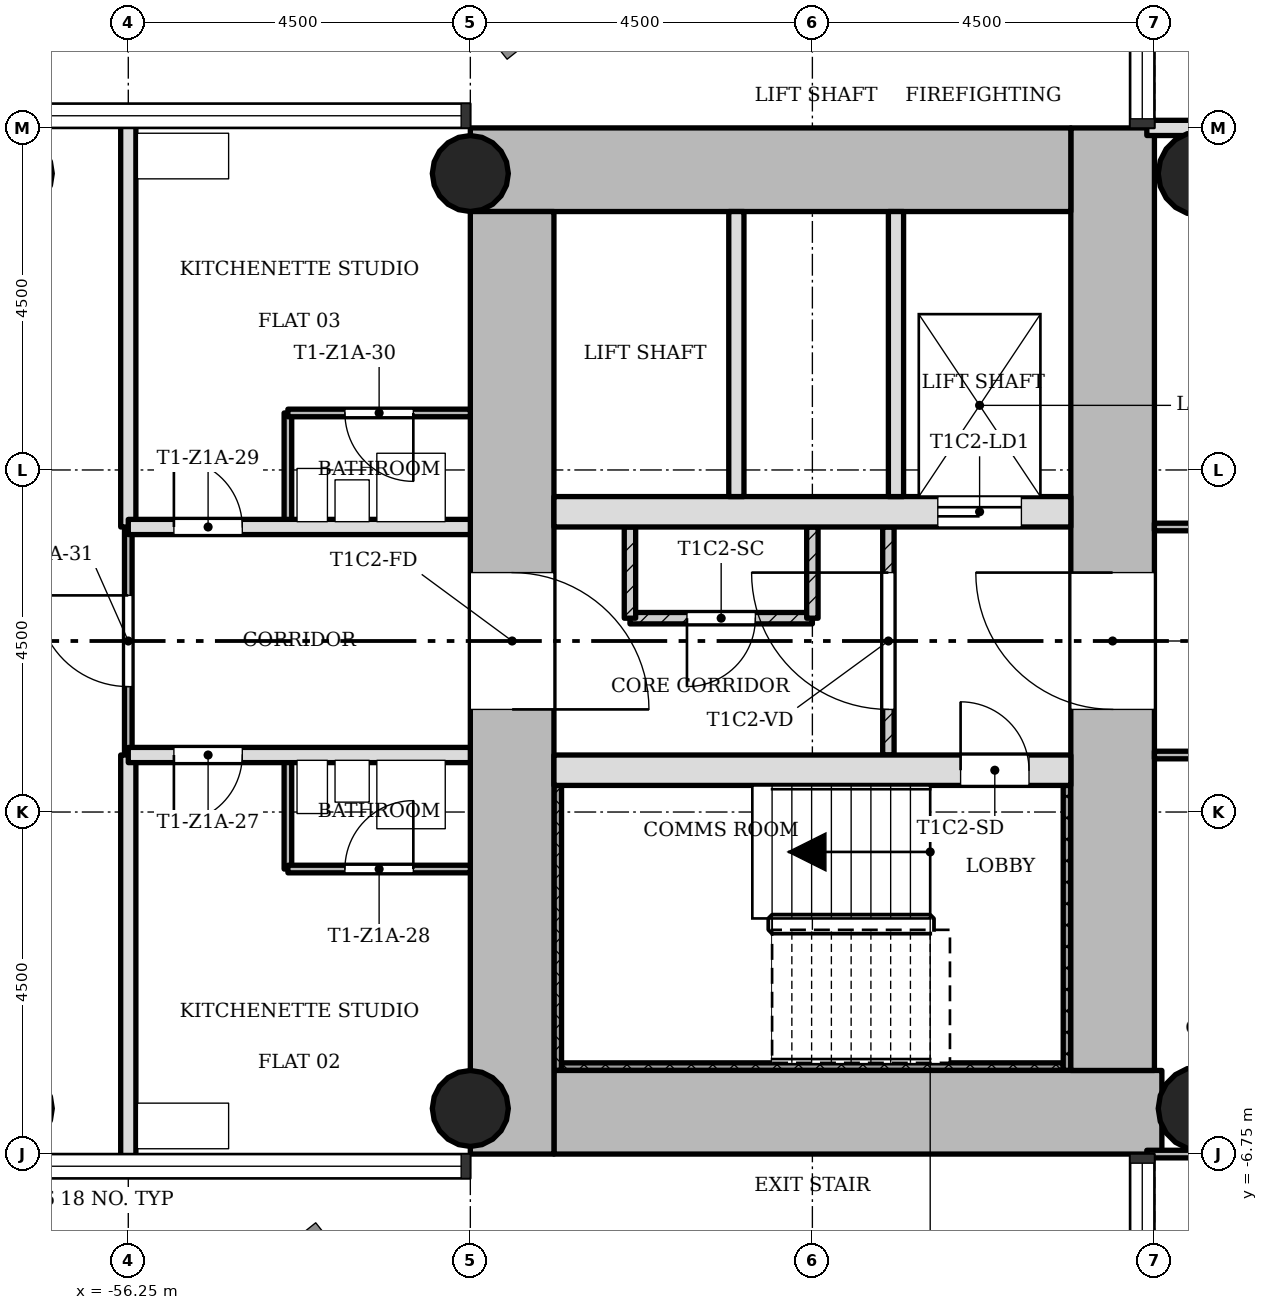
"""IFC4 building model, lengths in metres.
Left out: names, types, materials, properties, quantities, classifications, styles, units other than length and angle.
Written with IfcOpenShell. Run it as: python <this file> out.ifc"""

import sys

from ifc_helpers import new_model, si_unit, direction, frame, frame_2d, origin, origin_2d, place, context, subcontext, project, spatial, rectangle, hollow_circle, extrude, element, fill, save


model = new_model("IFC4")
c1 = context("Model", 3, precision=1e-05, world=origin(), true_north=direction((0.0, 1.0)))
c2 = subcontext(c1, "Body", "Model", "MODEL_VIEW")
j1 = project(units=[si_unit("LENGTHUNIT", "METRE"), si_unit("PLANEANGLEUNIT", "RADIAN")], contexts=[c1])
p1 = place(None, origin())
s1 = spatial("IfcSite", under=j1, at=p1, CompositionType="ELEMENT")
p2 = place(p1, origin())
s2 = spatial("IfcBuilding", under=s1, at=p2, CompositionType="ELEMENT")
p3 = place(p2, frame((0.0, 0.0, 24.5)))
s3 = spatial("IfcBuildingStorey", under=s2, at=p3, CompositionType="ELEMENT", Elevation=24.5)
p4 = place(p3, frame((-50.65, -6.2, 0.0), z_axis=(0.0, 0.0, 1.0), x_axis=(1.0, 0.0, 0.0)))
e1 = element("IfcWall", 1, at=p4, inside=s3, PredefinedType="SHEAR", context=c2, shape_type="SweptSolid", body=[
    extrude(rectangle(XDim=7.998, YDim=1.1, at=frame_2d((3.999, 0.0))), origin(), (0.0, 0.0, 1.0), 3.4),
])
p5 = place(p3, frame((-43.3, -5.65, 0.0), z_axis=(0.0, 0.0, 1.0), x_axis=(0.0, 1.0, 0.0)))
e2 = element("IfcWall", 2, at=p5, inside=s3, PredefinedType="SHEAR", context=c2, shape_type="SweptSolid", body=[
    extrude(rectangle(XDim=12.4, YDim=1.1, at=frame_2d((6.2, 0.0))), origin(), (0.0, 0.0, 1.0), 3.4),
])
p6 = place(p5, frame((4.75, 0.0, 0.0)))
e3 = element("IfcOpeningElement", 3, at=p6, cuts=e2, PredefinedType="OPENING", context=c2, shape_type="SweptSolid", body=[
    extrude(rectangle(XDim=1.8, YDim=2.1, at=frame_2d((0.9, 1.05))), frame((0.0, 0.56, 0.0), z_axis=(0.0, -1.0, 0.0), x_axis=(1.0, 0.0, 0.0)), (0.0, 0.0, 1.0), 1.12),
])
p7 = place(p3, frame((-43.85, 6.2, 0.0), z_axis=(0.0, 0.0, 1.0), x_axis=(-1.0, 0.0, 0.0)))
e4 = element("IfcWall", 4, at=p7, inside=s3, PredefinedType="SHEAR", context=c2, shape_type="SweptSolid", body=[
    extrude(rectangle(XDim=7.9, YDim=1.1, at=frame_2d((3.95, 0.0))), origin(), (0.0, 0.0, 1.0), 3.4),
])
p8 = place(p3, frame((-51.2, 5.65, 0.0), z_axis=(0.0, 0.0, 1.0), x_axis=(0.0, -1.0, 0.0)))
e5 = element("IfcWall", 5, at=p8, inside=s3, PredefinedType="SHEAR", context=c2, shape_type="SweptSolid", body=[
    extrude(rectangle(XDim=12.4, YDim=1.1, at=frame_2d((6.2, 0.0))), origin(), (0.0, 0.0, 1.0), 3.4),
])
p9 = place(p8, frame((4.75, 0.0, 0.0)))
e6 = element("IfcOpeningElement", 6, at=p9, cuts=e5, PredefinedType="OPENING", context=c2, shape_type="SweptSolid", body=[
    extrude(rectangle(XDim=1.8, YDim=2.1, at=frame_2d((0.9, 1.05))), frame((0.0, 0.56, 0.0), z_axis=(0.0, -1.0, 0.0), x_axis=(1.0, 0.0, 0.0)), (0.0, 0.0, 1.0), 1.12),
])
p10 = place(p3, frame((-50.65, -1.7, 0.0), z_axis=(0.0, 0.0, 1.0), x_axis=(1.0, 0.0, 0.0)))
e7 = element("IfcWall", 7, at=p10, inside=s3, PredefinedType="SHEAR", context=c2, shape_type="SweptSolid", body=[
    extrude(rectangle(XDim=6.8, YDim=0.4, at=frame_2d((3.4, 0.0))), origin(), (0.0, 0.0, 1.0), 3.4),
])
p11 = place(p10, frame((5.35, 0.0, 0.0)))
e8 = element("IfcOpeningElement", 8, at=p11, cuts=e7, PredefinedType="OPENING", context=c2, shape_type="SweptSolid", body=[
    extrude(rectangle(XDim=0.9, YDim=2.1, at=frame_2d((0.45, 1.05))), frame((0.0, 0.21, 0.0), z_axis=(0.0, -1.0, 0.0), x_axis=(1.0, 0.0, 0.0)), (0.0, 0.0, 1.0), 0.42),
])
p12 = place(p3, frame((-50.65, 1.7, 0.0), z_axis=(0.0, 0.0, 1.0), x_axis=(1.0, 0.0, 0.0)))
e9 = element("IfcWall", 9, at=p12, inside=s3, PredefinedType="SHEAR", context=c2, shape_type="SweptSolid", body=[
    extrude(rectangle(XDim=6.8, YDim=0.4, at=frame_2d((3.4, 0.0))), origin(), (0.0, 0.0, 1.0), 3.4),
])
p13 = place(p12, frame((5.05, 0.0, 0.0)))
e10 = element("IfcOpeningElement", 10, at=p13, cuts=e9, PredefinedType="OPENING", context=c2, shape_type="SweptSolid", body=[
    extrude(rectangle(XDim=1.1, YDim=2.1, at=frame_2d((0.55, 1.05))), frame((0.0, 0.21, 0.0), z_axis=(0.0, -1.0, 0.0), x_axis=(1.0, 0.0, 0.0)), (0.0, 0.0, 1.0), 0.42),
])
for number, where, z_axis, x_axis in (
    (11, (-51.75, -6.15, 0.0), (0.0, 0.0, 1.0), (1.0, 0.0, 0.0)),
    (12, (-51.75, 6.15, 0.0), (0.0, 0.0, 1.0), (1.0, 0.0, 0.0)),
):
    element("IfcColumn", number, at=place(p3, frame(where, z_axis=z_axis, x_axis=x_axis)), inside=s3, PredefinedType="COLUMN", context=c2, shape_type="SweptSolid", body=[
        extrude(hollow_circle(Radius=0.5, WallThickness=0.036, at=origin_2d()), origin(), (0.0, 0.0, 1.0), 3.4),
    ])
for number, where, z_axis, x_axis in (
    (13, (-42.15, -6.15, 0.0), (0.0, 0.0, 1.0), (1.0, 0.0, 0.0)),
    (14, (-42.15, 6.15, 0.0), (0.0, 0.0, 1.0), (1.0, 0.0, 0.0)),
):
    element("IfcColumn", number, at=place(p3, frame(where, z_axis=z_axis, x_axis=x_axis)), inside=s3, PredefinedType="COLUMN", context=c2, shape_type="SweptSolid", body=[
        extrude(hollow_circle(Radius=0.55, WallThickness=0.04, at=origin_2d()), origin(), (0.0, 0.0, 1.0), 3.4),
    ])
p14 = place(p3, frame((-46.25, 1.5, 0.0), z_axis=(0.0, 0.0, 1.0), x_axis=(0.0, -1.0, 0.0)))
e15 = element("IfcWall", 15, at=p14, inside=s3, PredefinedType="PARTITIONING", context=c2, shape_type="SweptSolid", body=[
    extrude(rectangle(XDim=3.0, YDim=0.15, at=frame_2d((1.5, 0.0))), origin(), (0.0, 0.0, 1.0), 3.0),
])
p15 = place(p14, frame((0.6, 0.0, 0.0)))
e16 = element("IfcOpeningElement", 16, at=p15, cuts=e15, PredefinedType="OPENING", context=c2, shape_type="SweptSolid", body=[
    extrude(rectangle(XDim=1.8, YDim=2.1, at=frame_2d((0.9, 1.05))), frame((0.0, 0.085, 0.0), z_axis=(0.0, -1.0, 0.0), x_axis=(1.0, 0.0, 0.0)), (0.0, 0.0, 1.0), 0.17),
])
for number, where, z_axis, x_axis in (
    (17, (-46.15, 5.65, 0.0), (0.0, 0.0, 1.0), (0.0, -1.0, 0.0)),
    (18, (-48.25, 5.65, 0.0), (0.0, 0.0, 1.0), (0.0, -1.0, 0.0)),
):
    element("IfcWall", number, at=place(p3, frame(where, z_axis=z_axis, x_axis=x_axis)), inside=s3, PredefinedType="SOLIDWALL", context=c2, shape_type="SweptSolid", body=[
        extrude(rectangle(XDim=3.75, YDim=0.2, at=frame_2d((1.875, 0.0))), origin(), (0.0, 0.0, 1.0), 3.0),
    ])
p16 = place(p3, frame((-47.25, 0.3, 0.0), z_axis=(0.0, 0.0, 1.0), x_axis=(-1.0, 0.0, 0.0)))
e19 = element("IfcWall", 19, at=p16, inside=s3, PredefinedType="PARTITIONING", context=c2, shape_type="SweptSolid", body=[
    extrude(rectangle(XDim=2.4, YDim=0.15, at=frame_2d((1.2, 0.0))), origin(), (0.0, 0.0, 1.0), 3.0),
])
p17 = place(p16, frame((0.75, 0.0, 0.0)))
e20 = element("IfcOpeningElement", 20, at=p17, cuts=e19, PredefinedType="OPENING", context=c2, shape_type="SweptSolid", body=[
    extrude(rectangle(XDim=0.9, YDim=2.1, at=frame_2d((0.45, 1.05))), frame((0.0, 0.085, 0.0), z_axis=(0.0, -1.0, 0.0), x_axis=(1.0, 0.0, 0.0)), (0.0, 0.0, 1.0), 0.17),
])
for number, where, z_axis, x_axis in (
    (21, (-47.25, 0.3, 0.0), (0.0, 0.0, 1.0), (0.0, 1.0, 0.0)),
    (22, (-49.65, 0.3, 0.0), (0.0, 0.0, 1.0), (0.0, 1.0, 0.0)),
):
    element("IfcWall", number, at=place(p3, frame(where, z_axis=z_axis, x_axis=x_axis)), inside=s3, PredefinedType="PARTITIONING", context=c2, shape_type="SweptSolid", body=[
        extrude(rectangle(XDim=1.2, YDim=0.15, at=frame_2d((0.6, 0.0))), origin(), (0.0, 0.0, 1.0), 3.0),
    ])
p18 = place(p3, frame((-56.25, -1.5, 0.0), z_axis=(0.0, 0.0, 1.0), x_axis=(0.0, 1.0, 0.0)))
e23 = element("IfcWall", 23, at=p18, inside=s3, PredefinedType="PARTITIONING", context=c2, shape_type="SweptSolid", body=[
    extrude(rectangle(XDim=3.0, YDim=0.1, at=frame_2d((1.5, 0.0))), origin(), (0.0, 0.0, 1.0), 3.0),
])
p19 = place(p18, frame((0.9, 0.0, 0.0)))
e24 = element("IfcOpeningElement", 24, at=p19, cuts=e23, PredefinedType="OPENING", context=c2, shape_type="SweptSolid", body=[
    extrude(rectangle(XDim=1.2, YDim=2.1, at=frame_2d((0.6, 1.05))), frame((0.0, 0.06, 0.0), z_axis=(0.0, -1.0, 0.0), x_axis=(1.0, 0.0, 0.0)), (0.0, 0.0, 1.0), 0.12),
])
for number, where, z_axis, x_axis in (
    (25, (-56.25, -6.85, 0.0), (0.0, 0.0, 1.0), (0.0, 1.0, 0.0)),
    (26, (-56.25, 1.5, 0.0), (0.0, 0.0, 1.0), (0.0, 1.0, 0.0)),
):
    element("IfcWall", number, at=place(p3, frame(where, z_axis=z_axis, x_axis=x_axis)), inside=s3, PredefinedType="SOLIDWALL", context=c2, shape_type="SweptSolid", body=[
        extrude(rectangle(XDim=5.35, YDim=0.2, at=frame_2d((2.675, 0.0))), origin(), (0.0, 0.0, 1.0), 3.0),
    ])
for number, where, z_axis, x_axis in (
    (27, (-54.15, -3.0, 0.0), (0.0, 0.0, 1.0), (0.0, 1.0, 0.0)),
    (28, (-54.15, 1.5, 0.0), (0.0, 0.0, 1.0), (0.0, 1.0, 0.0)),
):
    element("IfcWall", number, at=place(p3, frame(where, z_axis=z_axis, x_axis=x_axis)), inside=s3, PredefinedType="PARTITIONING", context=c2, shape_type="SweptSolid", body=[
        extrude(rectangle(XDim=1.5, YDim=0.1, at=frame_2d((0.75, 0.0))), origin(), (0.0, 0.0, 1.0), 3.0),
    ])
p20 = place(p3, frame((-42.85, -6.75, 0.0), z_axis=(0.0, 0.0, 1.0), x_axis=(1.0, 0.0, 0.0)))
e29 = element("IfcWall", 29, at=p20, inside=s3, PredefinedType="PARTITIONING", context=c2, shape_type="SweptSolid", body=[
    extrude(rectangle(XDim=5.95, YDim=0.1, at=frame_2d((2.975, 0.0))), origin(), (0.0, 0.0, 1.0), 3.0),
])
p21 = place(p3, frame((-54.15, -3.0, 0.0), z_axis=(0.0, 0.0, 1.0), x_axis=(1.0, 0.0, 0.0)))
e30 = element("IfcWall", 30, at=p21, inside=s3, PredefinedType="PARTITIONING", context=c2, shape_type="SweptSolid", body=[
    extrude(rectangle(XDim=2.4, YDim=0.1, at=frame_2d((1.2, 0.0))), origin(), (0.0, 0.0, 1.0), 3.0),
])
p22 = place(p21, frame((0.75, 0.0, 0.0)))
e31 = element("IfcOpeningElement", 31, at=p22, cuts=e30, PredefinedType="OPENING", context=c2, shape_type="SweptSolid", body=[
    extrude(rectangle(XDim=0.9, YDim=2.1, at=frame_2d((0.45, 1.05))), frame((0.0, 0.06, 0.0), z_axis=(0.0, -1.0, 0.0), x_axis=(1.0, 0.0, 0.0)), (0.0, 0.0, 1.0), 0.12),
])
p23 = place(p3, frame((-42.75, -1.5, 0.0), z_axis=(0.0, 0.0, 1.0), x_axis=(1.0, 0.0, 0.0)))
e32 = element("IfcWall", 32, at=p23, inside=s3, PredefinedType="PARTITIONING", context=c2, shape_type="SweptSolid", body=[
    extrude(rectangle(XDim=5.85, YDim=0.1, at=frame_2d((2.925, 0.0))), origin(), (0.0, 0.0, 1.0), 3.0),
])
p24 = place(p23, frame((2.475, 0.0, 0.0)))
e33 = element("IfcOpeningElement", 33, at=p24, cuts=e32, PredefinedType="OPENING", context=c2, shape_type="SweptSolid", body=[
    extrude(rectangle(XDim=0.9, YDim=2.1, at=frame_2d((0.45, 1.05))), frame((0.0, 0.06, 0.0), z_axis=(0.0, -1.0, 0.0), x_axis=(1.0, 0.0, 0.0)), (0.0, 0.0, 1.0), 0.12),
])
p25 = place(p3, frame((-56.25, -1.5, 0.0), z_axis=(0.0, 0.0, 1.0), x_axis=(1.0, 0.0, 0.0)))
e34 = element("IfcWall", 34, at=p25, inside=s3, PredefinedType="SOLIDWALL", context=c2, shape_type="SweptSolid", body=[
    extrude(rectangle(XDim=4.5, YDim=0.2, at=frame_2d((2.25, 0.0))), origin(), (0.0, 0.0, 1.0), 3.0),
])
p26 = place(p25, frame((0.6, 0.0, 0.0)))
e35 = element("IfcOpeningElement", 35, at=p26, cuts=e34, PredefinedType="OPENING", context=c2, shape_type="SweptSolid", body=[
    extrude(rectangle(XDim=0.9, YDim=2.1, at=frame_2d((0.45, 1.05))), frame((0.0, 0.11, 0.0), z_axis=(0.0, -1.0, 0.0), x_axis=(1.0, 0.0, 0.0)), (0.0, 0.0, 1.0), 0.22),
])
p27 = place(p3, frame((-42.75, 1.5, 0.0), z_axis=(0.0, 0.0, 1.0), x_axis=(1.0, 0.0, 0.0)))
e36 = element("IfcWall", 36, at=p27, inside=s3, PredefinedType="PARTITIONING", context=c2, shape_type="SweptSolid", body=[
    extrude(rectangle(XDim=5.85, YDim=0.1, at=frame_2d((2.925, 0.0))), origin(), (0.0, 0.0, 1.0), 3.0),
])
p28 = place(p27, frame((2.475, 0.0, 0.0)))
e37 = element("IfcOpeningElement", 37, at=p28, cuts=e36, PredefinedType="OPENING", context=c2, shape_type="SweptSolid", body=[
    extrude(rectangle(XDim=0.9, YDim=2.1, at=frame_2d((0.45, 1.05))), frame((0.0, 0.06, 0.0), z_axis=(0.0, -1.0, 0.0), x_axis=(1.0, 0.0, 0.0)), (0.0, 0.0, 1.0), 0.12),
])
p29 = place(p3, frame((-56.25, 1.5, 0.0), z_axis=(0.0, 0.0, 1.0), x_axis=(1.0, 0.0, 0.0)))
e38 = element("IfcWall", 38, at=p29, inside=s3, PredefinedType="SOLIDWALL", context=c2, shape_type="SweptSolid", body=[
    extrude(rectangle(XDim=4.5, YDim=0.2, at=frame_2d((2.25, 0.0))), origin(), (0.0, 0.0, 1.0), 3.0),
])
p30 = place(p29, frame((0.6, 0.0, 0.0)))
e39 = element("IfcOpeningElement", 39, at=p30, cuts=e38, PredefinedType="OPENING", context=c2, shape_type="SweptSolid", body=[
    extrude(rectangle(XDim=0.9, YDim=2.1, at=frame_2d((0.45, 1.05))), frame((0.0, 0.11, 0.0), z_axis=(0.0, -1.0, 0.0), x_axis=(1.0, 0.0, 0.0)), (0.0, 0.0, 1.0), 0.22),
])
p31 = place(p3, frame((-54.15, 3.0, 0.0), z_axis=(0.0, 0.0, 1.0), x_axis=(1.0, 0.0, 0.0)))
e40 = element("IfcWall", 40, at=p31, inside=s3, PredefinedType="PARTITIONING", context=c2, shape_type="SweptSolid", body=[
    extrude(rectangle(XDim=2.4, YDim=0.1, at=frame_2d((1.2, 0.0))), origin(), (0.0, 0.0, 1.0), 3.0),
])
p32 = place(p31, frame((0.75, 0.0, 0.0)))
e41 = element("IfcOpeningElement", 41, at=p32, cuts=e40, PredefinedType="OPENING", context=c2, shape_type="SweptSolid", body=[
    extrude(rectangle(XDim=0.9, YDim=2.1, at=frame_2d((0.45, 1.05))), frame((0.0, 0.06, 0.0), z_axis=(0.0, -1.0, 0.0), x_axis=(1.0, 0.0, 0.0)), (0.0, 0.0, 1.0), 0.12),
])
p33 = place(p3, frame((-42.85, 6.75, 0.0), z_axis=(0.0, 0.0, 1.0), x_axis=(1.0, 0.0, 0.0)))
e42 = element("IfcWall", 42, at=p33, inside=s3, PredefinedType="SOLIDWALL", context=c2, shape_type="SweptSolid", body=[
    extrude(rectangle(XDim=13.7, YDim=0.2, at=frame_2d((6.85, 0.0))), origin(), (0.0, 0.0, 1.0), 3.0),
])
p34 = place(p33, frame((6.4, 0.0, 0.0)))
e43 = element("IfcOpeningElement", 43, at=p34, cuts=e42, PredefinedType="OPENING", context=c2, shape_type="SweptSolid", body=[
    extrude(rectangle(XDim=0.9, YDim=2.1, at=frame_2d((0.45, 1.05))), frame((0.0, 0.11, 0.0), z_axis=(0.0, -1.0, 0.0), x_axis=(1.0, 0.0, 0.0)), (0.0, 0.0, 1.0), 0.22),
])
p35 = place(p3, frame((-50.6, -1.9, 0.0), z_axis=(0.0, 0.0, 1.0), x_axis=(0.0, -1.0, 0.0)))
e44 = element("IfcWall", 44, at=p35, inside=s3, PredefinedType="SHEAR", context=c2, shape_type="SweptSolid", body=[
    extrude(rectangle(XDim=3.75, YDim=0.1, at=frame_2d((1.875, 0.0))), origin(), (0.0, 0.0, 1.0), 3.4),
])
p36 = place(p3, frame((-43.95, -5.6, 0.0), z_axis=(0.0, 0.0, 1.0), x_axis=(-1.0, 0.0, 0.0)))
e45 = element("IfcWall", 45, at=p36, inside=s3, PredefinedType="SHEAR", context=c2, shape_type="SweptSolid", body=[
    extrude(rectangle(XDim=6.6, YDim=0.1, at=frame_2d((3.3, 0.0))), origin(), (0.0, 0.0, 1.0), 3.4),
])
p37 = place(p3, frame((-43.9, -1.9, 0.0), z_axis=(0.0, 0.0, 1.0), x_axis=(0.0, -1.0, 0.0)))
e46 = element("IfcWall", 46, at=p37, inside=s3, PredefinedType="SHEAR", context=c2, shape_type="SweptSolid", body=[
    extrude(rectangle(XDim=3.75, YDim=0.1, at=frame_2d((1.875, 0.0))), origin(), (0.0, 0.0, 1.0), 3.4),
])
p38 = place(p15, origin())
e47 = element("IfcDoor", 47, at=p38, inside=s3, OperationType="SINGLE_SWING_LEFT", PredefinedType="DOOR", context=c2, shape_type="SweptSolid", body=[
    extrude(rectangle(XDim=1.8, YDim=2.1, at=frame_2d((0.9, 1.05))), frame((0.0, 0.025, 0.0), z_axis=(0.0, -1.0, 0.0), x_axis=(1.0, 0.0, 0.0)), (0.0, 0.0, 1.0), 0.05),
])
fill(e16, e47)
p39 = place(p17, origin())
e48 = element("IfcDoor", 48, at=p39, inside=s3, OperationType="SINGLE_SWING_LEFT", PredefinedType="DOOR", context=c2, shape_type="SweptSolid", body=[
    extrude(rectangle(XDim=0.9, YDim=2.1, at=frame_2d((0.45, 1.05))), frame((0.0, 0.025, 0.0), z_axis=(0.0, -1.0, 0.0), x_axis=(1.0, 0.0, 0.0)), (0.0, 0.0, 1.0), 0.05),
])
fill(e20, e48)
p40 = place(p26, origin())
e49 = element("IfcDoor", 49, at=p40, inside=s3, OperationType="SINGLE_SWING_LEFT", PredefinedType="DOOR", context=c2, shape_type="SweptSolid", body=[
    extrude(rectangle(XDim=0.9, YDim=2.1, at=frame_2d((0.45, 1.05))), frame((0.0, 0.025, 0.0), z_axis=(0.0, -1.0, 0.0), x_axis=(1.0, 0.0, 0.0)), (0.0, 0.0, 1.0), 0.05),
])
fill(e35, e49)
p41 = place(p22, origin())
e50 = element("IfcDoor", 50, at=p41, inside=s3, OperationType="SINGLE_SWING_LEFT", PredefinedType="DOOR", context=c2, shape_type="SweptSolid", body=[
    extrude(rectangle(XDim=0.9, YDim=2.1, at=frame_2d((0.45, 1.05))), frame((0.0, 0.025, 0.0), z_axis=(0.0, -1.0, 0.0), x_axis=(1.0, 0.0, 0.0)), (0.0, 0.0, 1.0), 0.05),
])
fill(e31, e50)
p42 = place(p30, origin())
e51 = element("IfcDoor", 51, at=p42, inside=s3, OperationType="SINGLE_SWING_RIGHT", PredefinedType="DOOR", context=c2, shape_type="SweptSolid", body=[
    extrude(rectangle(XDim=0.9, YDim=2.1, at=frame_2d((0.45, 1.05))), frame((0.0, 0.025, 0.0), z_axis=(0.0, -1.0, 0.0), x_axis=(1.0, 0.0, 0.0)), (0.0, 0.0, 1.0), 0.05),
])
fill(e39, e51)
p43 = place(p32, origin())
e52 = element("IfcDoor", 52, at=p43, inside=s3, OperationType="SINGLE_SWING_RIGHT", PredefinedType="DOOR", context=c2, shape_type="SweptSolid", body=[
    extrude(rectangle(XDim=0.9, YDim=2.1, at=frame_2d((0.45, 1.05))), frame((0.0, 0.025, 0.0), z_axis=(0.0, -1.0, 0.0), x_axis=(1.0, 0.0, 0.0)), (0.0, 0.0, 1.0), 0.05),
])
fill(e41, e52)
p44 = place(p19, origin())
e53 = element("IfcDoor", 53, at=p44, inside=s3, OperationType="SINGLE_SWING_LEFT", PredefinedType="DOOR", context=c2, shape_type="SweptSolid", body=[
    extrude(rectangle(XDim=1.2, YDim=2.1, at=frame_2d((0.6, 1.05))), frame((0.0, 0.025, 0.0), z_axis=(0.0, -1.0, 0.0), x_axis=(1.0, 0.0, 0.0)), (0.0, 0.0, 1.0), 0.05),
])
fill(e24, e53)
p45 = place(p11, origin())
e54 = element("IfcDoor", 54, at=p45, inside=s3, OperationType="SINGLE_SWING_RIGHT", PredefinedType="DOOR", context=c2, shape_type="SweptSolid", body=[
    extrude(rectangle(XDim=0.9, YDim=2.1, at=frame_2d((0.45, 1.05))), frame((0.0, 0.025, 0.0), z_axis=(0.0, -1.0, 0.0), x_axis=(1.0, 0.0, 0.0)), (0.0, 0.0, 1.0), 0.05),
])
fill(e8, e54)
p46 = place(p13, origin())
e55 = element("IfcDoor", 55, at=p46, inside=s3, OperationType="SLIDING_TO_LEFT", PredefinedType="DOOR", context=c2, shape_type="SweptSolid", body=[
    extrude(rectangle(XDim=1.1, YDim=2.1, at=frame_2d((0.55, 1.05))), frame((0.0, 0.025, 0.0), z_axis=(0.0, -1.0, 0.0), x_axis=(1.0, 0.0, 0.0)), (0.0, 0.0, 1.0), 0.05),
])
fill(e10, e55)
p47 = place(p6, origin())
e56 = element("IfcDoor", 56, at=p47, inside=s3, OperationType="SINGLE_SWING_LEFT", PredefinedType="DOOR", context=c2, shape_type="SweptSolid", body=[
    extrude(rectangle(XDim=1.8, YDim=2.1, at=frame_2d((0.9, 1.05))), frame((0.0, 0.025, 0.0), z_axis=(0.0, -1.0, 0.0), x_axis=(1.0, 0.0, 0.0)), (0.0, 0.0, 1.0), 0.05),
])
fill(e3, e56)
p48 = place(p9, origin())
e57 = element("IfcDoor", 57, at=p48, inside=s3, OperationType="SINGLE_SWING_LEFT", PredefinedType="DOOR", context=c2, shape_type="SweptSolid", body=[
    extrude(rectangle(XDim=1.8, YDim=2.1, at=frame_2d((0.9, 1.05))), frame((0.0, 0.025, 0.0), z_axis=(0.0, -1.0, 0.0), x_axis=(1.0, 0.0, 0.0)), (0.0, 0.0, 1.0), 0.05),
])
fill(e6, e57)
save(model, sys.argv[1])
